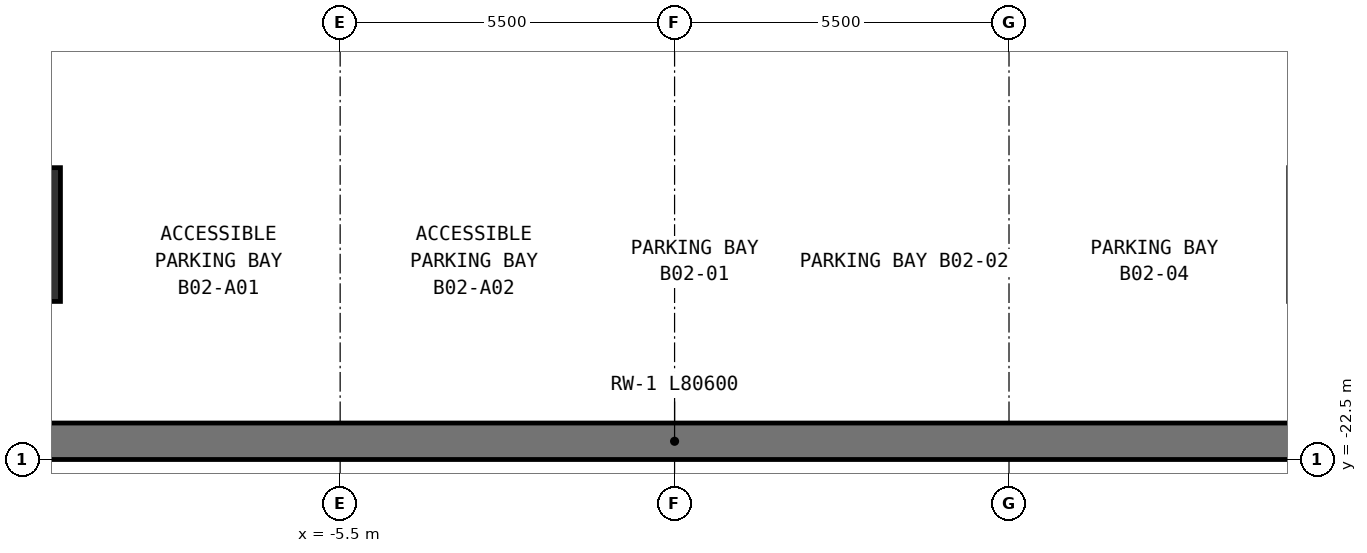
"""IFC4 building model, lengths in metres.
Left out: names, types, materials, properties, quantities, classifications, styles, units other than length and angle.
Written with IfcOpenShell. Run it as: python <this file> out.ifc"""

import sys

from ifc_helpers import new_model, si_unit, direction, frame, frame_2d, origin, origin_2d, place, context, subcontext, project, spatial, rectangle, extrude, element, save


model = new_model("IFC4")
c1 = context("Model", 3, precision=1e-05, world=origin(), true_north=direction((0.0, 1.0)))
c2 = subcontext(c1, "Body", "Model", "MODEL_VIEW")
j1 = project(units=[si_unit("LENGTHUNIT", "METRE"), si_unit("PLANEANGLEUNIT", "RADIAN")], contexts=[c1])
p1 = place(None, origin())
s1 = spatial("IfcSite", under=j1, at=p1, CompositionType="ELEMENT")
p2 = place(p1, origin())
s2 = spatial("IfcBuilding", under=s1, at=p2, CompositionType="ELEMENT")
p3 = place(p2, frame((0.0, 0.0, -9.0)))
s3 = spatial("IfcBuildingStorey", under=s2, at=p3, CompositionType="ELEMENT", Elevation=-9.0)
p4 = place(p3, frame((-40.3, -22.2, 0.0), z_axis=(0.0, 0.0, 1.0), x_axis=(1.0, 0.0, 0.0)))
e1 = element("IfcWall", 1, at=p4, inside=s3, PredefinedType="SOLIDWALL", context=c2, shape_type="SweptSolid", body=[
    extrude(rectangle(XDim=80.6, YDim=0.6, at=frame_2d((40.3, 0.0))), origin(), (0.0, 0.0, 1.0), 4.2),
])
p5 = place(p3, frame((-11.0, -18.8, 0.0), z_axis=(0.0, 0.0, 1.0), x_axis=(1.0, 0.0, 0.0)))
e2 = element("IfcColumn", 2, at=p5, inside=s3, PredefinedType="COLUMN", context=c2, shape_type="SweptSolid", body=[
    extrude(rectangle(XDim=1.8, YDim=2.2, at=origin_2d()), origin(), (0.0, 0.0, 1.0), 4.5),
])
save(model, sys.argv[1])
